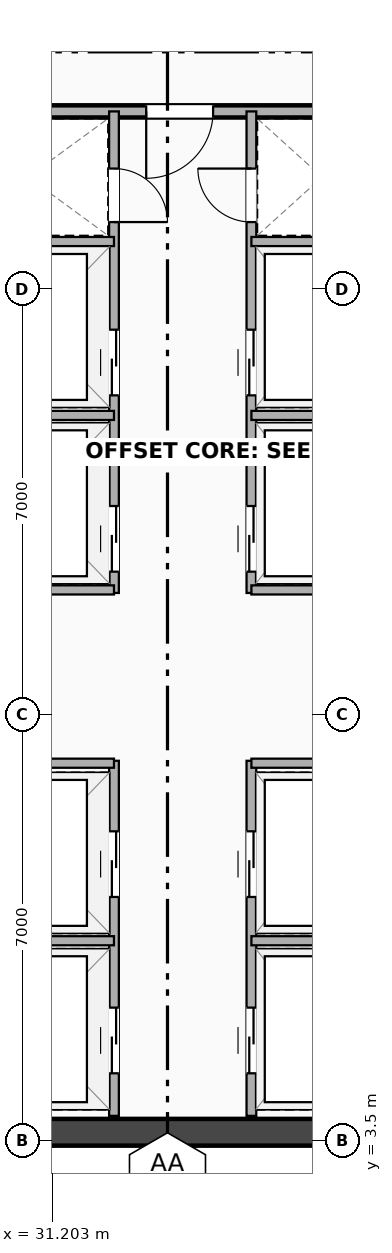
"""IFC4 building model, lengths in metres.
Left out: names, types, materials, properties, quantities, classifications, styles, units other than length and angle.
Written with IfcOpenShell. Run it as: python <this file> out.ifc"""

import sys

from ifc_helpers import new_model, si_unit, direction, frame, frame_2d, origin, place, context, subcontext, project, spatial, rectangle, extrude, element, fill, save


model = new_model("IFC4")
c1 = context("Model", 3, precision=1e-05, world=origin(), true_north=direction((0.0, 1.0)))
c2 = subcontext(c1, "Body", "Model", "MODEL_VIEW")
j1 = project(units=[si_unit("LENGTHUNIT", "METRE"), si_unit("PLANEANGLEUNIT", "RADIAN")], contexts=[c1])
p1 = place(None, origin())
s1 = spatial("IfcSite", under=j1, at=p1, CompositionType="ELEMENT")
p2 = place(p1, origin())
s2 = spatial("IfcBuilding", under=s1, at=p2, CompositionType="ELEMENT")
p3 = place(p2, frame((0.0, 0.0, 83.8)))
s3 = spatial("IfcBuildingStorey", under=s2, at=p3, CompositionType="ELEMENT", Elevation=83.8)
p4 = place(p3, frame((20.3, 3.63, 0.0), z_axis=(0.0, 0.0, 1.0), x_axis=(1.0, 0.0, 0.0)))
e1 = element("IfcWall", 1, at=p4, inside=s3, PredefinedType="SHEAR", context=c2, shape_type="SweptSolid", body=[
    extrude(rectangle(XDim=24.5, YDim=0.44, at=frame_2d((12.25, 0.0))), origin(), (0.0, 0.0, 1.0), 4.14),
])
p5 = place(p3, frame((29.2, 20.42, 0.0), z_axis=(0.0, 0.0, 1.0), x_axis=(1.0, 0.0, 0.0)))
e2 = element("IfcWall", 2, at=p5, inside=s3, PredefinedType="PARTITIONING", context=c2, shape_type="SweptSolid", body=[
    extrude(rectangle(XDim=7.8, YDim=0.2, at=frame_2d((3.9, 0.0))), origin(), (0.0, 0.0, 1.0), 3.213),
])
p6 = place(p5, frame((3.55, 0.0, 0.0)))
e3 = element("IfcOpeningElement", 3, at=p6, cuts=e2, PredefinedType="OPENING", context=c2, shape_type="SweptSolid", body=[
    extrude(rectangle(XDim=1.1, YDim=2.15, at=frame_2d((0.55, 1.075))), frame((0.0, 0.11, 0.0), z_axis=(0.0, -1.0, 0.0), x_axis=(1.0, 0.0, 0.0)), (0.0, 0.0, 1.0), 0.22),
])
p7 = place(p3, frame((32.22, 3.9, 0.0), z_axis=(0.0, 0.0, 1.0), x_axis=(0.0, 1.0, 0.0)))
e4 = element("IfcWall", 4, at=p7, inside=s3, PredefinedType="PARTITIONING", context=c2, shape_type="SweptSolid", body=[
    extrude(rectangle(XDim=5.84, YDim=0.16, at=frame_2d((2.92, 0.0))), origin(), (0.0, 0.0, 1.0), 4.14),
])
p8 = place(p7, frame((1.78, 0.0, 0.0), z_axis=(0.0, 0.0, 1.0), x_axis=(-1.0, 0.0, 0.0)))
e5 = element("IfcOpeningElement", 5, at=p8, cuts=e4, PredefinedType="OPENING", context=c2, shape_type="SweptSolid", body=[
    extrude(rectangle(XDim=1.08, YDim=2.16, at=frame_2d((0.54, 1.08))), frame((0.0, 0.09, 0.0), z_axis=(0.0, -1.0, 0.0), x_axis=(1.0, 0.0, 0.0)), (0.0, 0.0, 1.0), 0.18),
])
p9 = place(p7, frame((4.68, 0.0, 0.0), z_axis=(0.0, 0.0, 1.0), x_axis=(-1.0, 0.0, 0.0)))
e6 = element("IfcOpeningElement", 6, at=p9, cuts=e4, PredefinedType="OPENING", context=c2, shape_type="SweptSolid", body=[
    extrude(rectangle(XDim=1.08, YDim=2.16, at=frame_2d((0.54, 1.08))), frame((0.0, 0.09, 0.0), z_axis=(0.0, -1.0, 0.0), x_axis=(1.0, 0.0, 0.0)), (0.0, 0.0, 1.0), 0.18),
])
p10 = place(p3, frame((34.48, 3.9, 0.0), z_axis=(0.0, 0.0, 1.0), x_axis=(0.0, 1.0, 0.0)))
e7 = element("IfcWall", 7, at=p10, inside=s3, PredefinedType="PARTITIONING", context=c2, shape_type="SweptSolid", body=[
    extrude(rectangle(XDim=5.84, YDim=0.16, at=frame_2d((2.92, 0.0))), origin(), (0.0, 0.0, 1.0), 4.14),
])
p11 = place(p10, frame((0.7, 0.0, 0.0)))
e8 = element("IfcOpeningElement", 8, at=p11, cuts=e7, PredefinedType="OPENING", context=c2, shape_type="SweptSolid", body=[
    extrude(rectangle(XDim=1.08, YDim=2.16, at=frame_2d((0.54, 1.08))), frame((0.0, 0.09, 0.0), z_axis=(0.0, -1.0, 0.0), x_axis=(1.0, 0.0, 0.0)), (0.0, 0.0, 1.0), 0.18),
])
p12 = place(p10, frame((3.6, 0.0, 0.0)))
e9 = element("IfcOpeningElement", 9, at=p12, cuts=e7, PredefinedType="OPENING", context=c2, shape_type="SweptSolid", body=[
    extrude(rectangle(XDim=1.08, YDim=2.16, at=frame_2d((0.54, 1.08))), frame((0.0, 0.09, 0.0), z_axis=(0.0, -1.0, 0.0), x_axis=(1.0, 0.0, 0.0)), (0.0, 0.0, 1.0), 0.18),
])
p13 = place(p3, frame((29.45, 6.78, 0.0), z_axis=(0.0, 0.0, 1.0), x_axis=(1.0, 0.0, 0.0)))
e10 = element("IfcWall", 10, at=p13, inside=s3, PredefinedType="PARTITIONING", context=c2, shape_type="SweptSolid", body=[
    extrude(rectangle(XDim=2.77, YDim=0.15, at=frame_2d((1.385, 0.0))), origin(), (0.0, 0.0, 1.0), 4.14),
])
p14 = place(p3, frame((34.48, 6.78, 0.0), z_axis=(0.0, 0.0, 1.0), x_axis=(1.0, 0.0, 0.0)))
e11 = element("IfcWall", 11, at=p14, inside=s3, PredefinedType="PARTITIONING", context=c2, shape_type="SweptSolid", body=[
    extrude(rectangle(XDim=2.27, YDim=0.15, at=frame_2d((1.135, 0.0))), origin(), (0.0, 0.0, 1.0), 4.14),
])
p15 = place(p3, frame((29.45, 9.7, 0.0), z_axis=(0.0, 0.0, 1.0), x_axis=(1.0, 0.0, 0.0)))
e12 = element("IfcWall", 12, at=p15, inside=s3, PredefinedType="PARTITIONING", context=c2, shape_type="SweptSolid", body=[
    extrude(rectangle(XDim=2.77, YDim=0.15, at=frame_2d((1.385, 0.0))), origin(), (0.0, 0.0, 1.0), 4.14),
])
p16 = place(p3, frame((34.48, 9.7, 0.0), z_axis=(0.0, 0.0, 1.0), x_axis=(1.0, 0.0, 0.0)))
e13 = element("IfcWall", 13, at=p16, inside=s3, PredefinedType="PARTITIONING", context=c2, shape_type="SweptSolid", body=[
    extrude(rectangle(XDim=2.27, YDim=0.15, at=frame_2d((1.135, 0.0))), origin(), (0.0, 0.0, 1.0), 4.14),
])
p17 = place(p3, frame((32.22, 12.5, 0.0), z_axis=(0.0, 0.0, 1.0), x_axis=(0.0, 1.0, 0.0)))
e14 = element("IfcWall", 14, at=p17, inside=s3, PredefinedType="PARTITIONING", context=c2, shape_type="SweptSolid", body=[
    extrude(rectangle(XDim=7.92, YDim=0.16, at=frame_2d((3.96, 0.0))), origin(), (0.0, 0.0, 1.0), 3.514),
])
p18 = place(p17, frame((1.43, 0.0, 0.0), z_axis=(0.0, 0.0, 1.0), x_axis=(-1.0, 0.0, 0.0)))
e15 = element("IfcOpeningElement", 15, at=p18, cuts=e14, PredefinedType="OPENING", context=c2, shape_type="SweptSolid", body=[
    extrude(rectangle(XDim=1.08, YDim=2.16, at=frame_2d((0.54, 1.08))), frame((0.0, 0.09, 0.0), z_axis=(0.0, -1.0, 0.0), x_axis=(1.0, 0.0, 0.0)), (0.0, 0.0, 1.0), 0.18),
])
p19 = place(p17, frame((4.33, 0.0, 0.0), z_axis=(0.0, 0.0, 1.0), x_axis=(-1.0, 0.0, 0.0)))
e16 = element("IfcOpeningElement", 16, at=p19, cuts=e14, PredefinedType="OPENING", context=c2, shape_type="SweptSolid", body=[
    extrude(rectangle(XDim=1.08, YDim=2.16, at=frame_2d((0.54, 1.08))), frame((0.0, 0.09, 0.0), z_axis=(0.0, -1.0, 0.0), x_axis=(1.0, 0.0, 0.0)), (0.0, 0.0, 1.0), 0.18),
])
p20 = place(p17, frame((6.1, 0.0, 0.0)))
e17 = element("IfcOpeningElement", 17, at=p20, cuts=e14, PredefinedType="OPENING", context=c2, shape_type="SweptSolid", body=[
    extrude(rectangle(XDim=0.88, YDim=2.08, at=frame_2d((0.44, 1.04))), frame((0.0, 0.09, 0.0), z_axis=(0.0, -1.0, 0.0), x_axis=(1.0, 0.0, 0.0)), (0.0, 0.0, 1.0), 0.18),
])
p21 = place(p3, frame((34.48, 12.5, 0.0), z_axis=(0.0, 0.0, 1.0), x_axis=(0.0, 1.0, 0.0)))
e18 = element("IfcWall", 18, at=p21, inside=s3, PredefinedType="PARTITIONING", context=c2, shape_type="SweptSolid", body=[
    extrude(rectangle(XDim=7.92, YDim=0.16, at=frame_2d((3.96, 0.0))), origin(), (0.0, 0.0, 1.0), 3.514),
])
p22 = place(p21, frame((0.35, 0.0, 0.0)))
e19 = element("IfcOpeningElement", 19, at=p22, cuts=e18, PredefinedType="OPENING", context=c2, shape_type="SweptSolid", body=[
    extrude(rectangle(XDim=1.08, YDim=2.16, at=frame_2d((0.54, 1.08))), frame((0.0, 0.09, 0.0), z_axis=(0.0, -1.0, 0.0), x_axis=(1.0, 0.0, 0.0)), (0.0, 0.0, 1.0), 0.18),
])
p23 = place(p21, frame((3.25, 0.0, 0.0)))
e20 = element("IfcOpeningElement", 20, at=p23, cuts=e18, PredefinedType="OPENING", context=c2, shape_type="SweptSolid", body=[
    extrude(rectangle(XDim=1.08, YDim=2.16, at=frame_2d((0.54, 1.08))), frame((0.0, 0.09, 0.0), z_axis=(0.0, -1.0, 0.0), x_axis=(1.0, 0.0, 0.0)), (0.0, 0.0, 1.0), 0.18),
])
p24 = place(p21, frame((6.98, 0.0, 0.0), z_axis=(0.0, 0.0, 1.0), x_axis=(-1.0, 0.0, 0.0)))
e21 = element("IfcOpeningElement", 21, at=p24, cuts=e18, PredefinedType="OPENING", context=c2, shape_type="SweptSolid", body=[
    extrude(rectangle(XDim=0.88, YDim=2.08, at=frame_2d((0.44, 1.04))), frame((0.0, 0.09, 0.0), z_axis=(0.0, -1.0, 0.0), x_axis=(1.0, 0.0, 0.0)), (0.0, 0.0, 1.0), 0.18),
])
p25 = place(p3, frame((29.45, 12.55, 0.0), z_axis=(0.0, 0.0, 1.0), x_axis=(1.0, 0.0, 0.0)))
e22 = element("IfcWall", 22, at=p25, inside=s3, PredefinedType="PARTITIONING", context=c2, shape_type="SweptSolid", body=[
    extrude(rectangle(XDim=2.77, YDim=0.15, at=frame_2d((1.385, 0.0))), origin(), (0.0, 0.0, 1.0), 4.14),
])
p26 = place(p3, frame((34.48, 12.55, 0.0), z_axis=(0.0, 0.0, 1.0), x_axis=(1.0, 0.0, 0.0)))
e23 = element("IfcWall", 23, at=p26, inside=s3, PredefinedType="PARTITIONING", context=c2, shape_type="SweptSolid", body=[
    extrude(rectangle(XDim=2.27, YDim=0.15, at=frame_2d((1.135, 0.0))), origin(), (0.0, 0.0, 1.0), 4.14),
])
p27 = place(p3, frame((29.45, 15.42, 0.0), z_axis=(0.0, 0.0, 1.0), x_axis=(1.0, 0.0, 0.0)))
e24 = element("IfcWall", 24, at=p27, inside=s3, PredefinedType="PARTITIONING", context=c2, shape_type="SweptSolid", body=[
    extrude(rectangle(XDim=2.77, YDim=0.15, at=frame_2d((1.385, 0.0))), origin(), (0.0, 0.0, 1.0), 4.14),
])
p28 = place(p3, frame((34.48, 15.42, 0.0), z_axis=(0.0, 0.0, 1.0), x_axis=(1.0, 0.0, 0.0)))
e25 = element("IfcWall", 25, at=p28, inside=s3, PredefinedType="PARTITIONING", context=c2, shape_type="SweptSolid", body=[
    extrude(rectangle(XDim=2.27, YDim=0.15, at=frame_2d((1.135, 0.0))), origin(), (0.0, 0.0, 1.0), 4.14),
])
p29 = place(p3, frame((29.45, 18.28, 0.0), z_axis=(0.0, 0.0, 1.0), x_axis=(1.0, 0.0, 0.0)))
e26 = element("IfcWall", 26, at=p29, inside=s3, PredefinedType="PARTITIONING", context=c2, shape_type="SweptSolid", body=[
    extrude(rectangle(XDim=2.77, YDim=0.15, at=frame_2d((1.385, 0.0))), origin(), (0.0, 0.0, 1.0), 4.14),
])
p30 = place(p3, frame((34.48, 18.28, 0.0), z_axis=(0.0, 0.0, 1.0), x_axis=(1.0, 0.0, 0.0)))
e27 = element("IfcWall", 27, at=p30, inside=s3, PredefinedType="PARTITIONING", context=c2, shape_type="SweptSolid", body=[
    extrude(rectangle(XDim=2.27, YDim=0.15, at=frame_2d((1.135, 0.0))), origin(), (0.0, 0.0, 1.0), 4.14),
])
p31 = place(p6, origin())
e28 = element("IfcDoor", 28, at=p31, inside=s3, OperationType="SINGLE_SWING_LEFT", PredefinedType="DOOR", context=c2, shape_type="SweptSolid", body=[
    extrude(rectangle(XDim=1.1, YDim=2.15, at=frame_2d((0.55, 1.075))), frame((0.0, 0.025, 0.0), z_axis=(0.0, -1.0, 0.0), x_axis=(1.0, 0.0, 0.0)), (0.0, 0.0, 1.0), 0.05),
])
fill(e3, e28)
p32 = place(p8, origin())
e29 = element("IfcDoor", 29, at=p32, inside=s3, OperationType="DOUBLE_DOOR_SLIDING", PredefinedType="DOOR", context=c2, shape_type="SweptSolid", body=[
    extrude(rectangle(XDim=1.08, YDim=2.16, at=frame_2d((0.54, 1.08))), frame((0.0, 0.025, 0.0), z_axis=(0.0, -1.0, 0.0), x_axis=(1.0, 0.0, 0.0)), (0.0, 0.0, 1.0), 0.05),
])
fill(e5, e29)
p33 = place(p9, origin())
e30 = element("IfcDoor", 30, at=p33, inside=s3, OperationType="DOUBLE_DOOR_SLIDING", PredefinedType="DOOR", context=c2, shape_type="SweptSolid", body=[
    extrude(rectangle(XDim=1.08, YDim=2.16, at=frame_2d((0.54, 1.08))), frame((0.0, 0.025, 0.0), z_axis=(0.0, -1.0, 0.0), x_axis=(1.0, 0.0, 0.0)), (0.0, 0.0, 1.0), 0.05),
])
fill(e6, e30)
p34 = place(p11, origin())
e31 = element("IfcDoor", 31, at=p34, inside=s3, OperationType="DOUBLE_DOOR_SLIDING", PredefinedType="DOOR", context=c2, shape_type="SweptSolid", body=[
    extrude(rectangle(XDim=1.08, YDim=2.16, at=frame_2d((0.54, 1.08))), frame((0.0, 0.025, 0.0), z_axis=(0.0, -1.0, 0.0), x_axis=(1.0, 0.0, 0.0)), (0.0, 0.0, 1.0), 0.05),
])
fill(e8, e31)
p35 = place(p12, origin())
e32 = element("IfcDoor", 32, at=p35, inside=s3, OperationType="DOUBLE_DOOR_SLIDING", PredefinedType="DOOR", context=c2, shape_type="SweptSolid", body=[
    extrude(rectangle(XDim=1.08, YDim=2.16, at=frame_2d((0.54, 1.08))), frame((0.0, 0.025, 0.0), z_axis=(0.0, -1.0, 0.0), x_axis=(1.0, 0.0, 0.0)), (0.0, 0.0, 1.0), 0.05),
])
fill(e9, e32)
p36 = place(p18, origin())
e33 = element("IfcDoor", 33, at=p36, inside=s3, OperationType="DOUBLE_DOOR_SLIDING", PredefinedType="DOOR", context=c2, shape_type="SweptSolid", body=[
    extrude(rectangle(XDim=1.08, YDim=2.16, at=frame_2d((0.54, 1.08))), frame((0.0, 0.025, 0.0), z_axis=(0.0, -1.0, 0.0), x_axis=(1.0, 0.0, 0.0)), (0.0, 0.0, 1.0), 0.05),
])
fill(e15, e33)
p37 = place(p19, origin())
e34 = element("IfcDoor", 34, at=p37, inside=s3, OperationType="DOUBLE_DOOR_SLIDING", PredefinedType="DOOR", context=c2, shape_type="SweptSolid", body=[
    extrude(rectangle(XDim=1.08, YDim=2.16, at=frame_2d((0.54, 1.08))), frame((0.0, 0.025, 0.0), z_axis=(0.0, -1.0, 0.0), x_axis=(1.0, 0.0, 0.0)), (0.0, 0.0, 1.0), 0.05),
])
fill(e16, e34)
p38 = place(p20, origin())
e35 = element("IfcDoor", 35, at=p38, inside=s3, OperationType="SINGLE_SWING_LEFT", PredefinedType="DOOR", context=c2, shape_type="SweptSolid", body=[
    extrude(rectangle(XDim=0.88, YDim=2.08, at=frame_2d((0.44, 1.04))), frame((0.0, 0.025, 0.0), z_axis=(0.0, -1.0, 0.0), x_axis=(1.0, 0.0, 0.0)), (0.0, 0.0, 1.0), 0.05),
])
fill(e17, e35)
p39 = place(p22, origin())
e36 = element("IfcDoor", 36, at=p39, inside=s3, OperationType="DOUBLE_DOOR_SLIDING", PredefinedType="DOOR", context=c2, shape_type="SweptSolid", body=[
    extrude(rectangle(XDim=1.08, YDim=2.16, at=frame_2d((0.54, 1.08))), frame((0.0, 0.025, 0.0), z_axis=(0.0, -1.0, 0.0), x_axis=(1.0, 0.0, 0.0)), (0.0, 0.0, 1.0), 0.05),
])
fill(e19, e36)
p40 = place(p23, origin())
e37 = element("IfcDoor", 37, at=p40, inside=s3, OperationType="DOUBLE_DOOR_SLIDING", PredefinedType="DOOR", context=c2, shape_type="SweptSolid", body=[
    extrude(rectangle(XDim=1.08, YDim=2.16, at=frame_2d((0.54, 1.08))), frame((0.0, 0.025, 0.0), z_axis=(0.0, -1.0, 0.0), x_axis=(1.0, 0.0, 0.0)), (0.0, 0.0, 1.0), 0.05),
])
fill(e20, e37)
p41 = place(p24, origin())
e38 = element("IfcDoor", 38, at=p41, inside=s3, OperationType="SINGLE_SWING_RIGHT", PredefinedType="DOOR", context=c2, shape_type="SweptSolid", body=[
    extrude(rectangle(XDim=0.88, YDim=2.08, at=frame_2d((0.44, 1.04))), frame((0.0, 0.025, 0.0), z_axis=(0.0, -1.0, 0.0), x_axis=(1.0, 0.0, 0.0)), (0.0, 0.0, 1.0), 0.05),
])
fill(e21, e38)
save(model, sys.argv[1])
